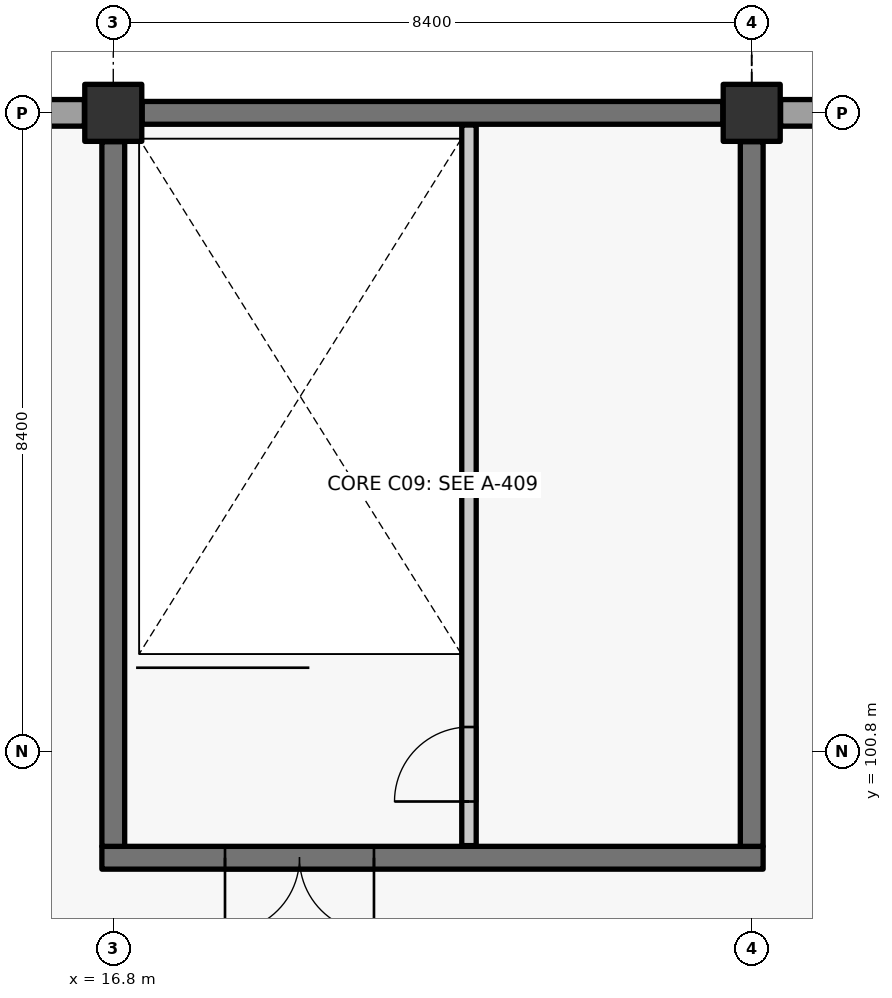
"""IFC4 building model, lengths in metres.
Left out: names, types, materials, properties, quantities, classifications, styles, units other than length and angle.
Written with IfcOpenShell. Run it as: python <this file> out.ifc"""

import sys

from ifc_helpers import new_model, si_unit, direction, frame, frame_2d, origin, origin_2d, place, context, subcontext, project, spatial, rectangle, extrude, element, fill, save


model = new_model("IFC4")
c1 = context("Model", 3, precision=1e-05, world=origin(), true_north=direction((0.0, 1.0)))
c2 = subcontext(c1, "Body", "Model", "MODEL_VIEW")
j1 = project(units=[si_unit("LENGTHUNIT", "METRE"), si_unit("PLANEANGLEUNIT", "RADIAN")], contexts=[c1])
p1 = place(None, origin())
s1 = spatial("IfcSite", under=j1, at=p1, CompositionType="ELEMENT")
p2 = place(p1, origin())
s2 = spatial("IfcBuilding", under=s1, at=p2, CompositionType="ELEMENT")
p3 = place(p2, frame((0.0, 0.0, 11.4)))
s3 = spatial("IfcBuildingStorey", under=s2, at=p3, CompositionType="ELEMENT", Elevation=11.4)
for number, where, z_axis, x_axis in (
    (1, (16.8, 109.2, 0.0), (0.0, 0.0, 1.0), (1.0, 0.0, 0.0)),
    (2, (25.2, 109.2, 0.0), (0.0, 0.0, 1.0), (1.0, 0.0, 0.0)),
):
    element("IfcColumn", number, at=place(p3, frame(where, z_axis=z_axis, x_axis=x_axis)), inside=s3, PredefinedType="COLUMN", context=c2, shape_type="SweptSolid", body=[
        extrude(rectangle(XDim=0.75, YDim=0.75, at=origin_2d()), origin(), (0.0, 0.0, 1.0), 4.8),
    ])
p4 = place(p3, frame((8.78, 109.2, 0.0), z_axis=(0.0, 0.0, 1.0), x_axis=(1.0, 0.0, 0.0)))
e3 = element("IfcWall", 3, at=p4, inside=s3, PredefinedType="SOLIDWALL", context=c2, shape_type="SweptSolid", body=[
    extrude(rectangle(XDim=7.64, YDim=0.35, at=frame_2d((3.82, 0.0))), origin(), (0.0, 0.0, 1.0), 4.52),
])
p5 = place(p4, frame((2.02, 0.0, 1.4)))
e4 = element("IfcOpeningElement", 4, at=p5, cuts=e3, PredefinedType="OPENING", context=c2, shape_type="SweptSolid", body=[
    extrude(rectangle(XDim=3.6, YDim=1.35, at=frame_2d((1.8, 0.675))), frame((0.0, 0.185, 0.0), z_axis=(0.0, -1.0, 0.0), x_axis=(1.0, 0.0, 0.0)), (0.0, 0.0, 1.0), 0.37),
])
p6 = place(p3, frame((25.58, 109.2, 0.0), z_axis=(0.0, 0.0, 1.0), x_axis=(1.0, 0.0, 0.0)))
e5 = element("IfcWall", 5, at=p6, inside=s3, PredefinedType="SOLIDWALL", context=c2, shape_type="SweptSolid", body=[
    extrude(rectangle(XDim=7.64, YDim=0.35, at=frame_2d((3.82, 0.0))), origin(), (0.0, 0.0, 1.0), 4.52),
])
p7 = place(p6, frame((2.02, 0.0, 1.4)))
e6 = element("IfcOpeningElement", 6, at=p7, cuts=e5, PredefinedType="OPENING", context=c2, shape_type="SweptSolid", body=[
    extrude(rectangle(XDim=3.6, YDim=1.35, at=frame_2d((1.8, 0.675))), frame((0.0, 0.185, 0.0), z_axis=(0.0, -1.0, 0.0), x_axis=(1.0, 0.0, 0.0)), (0.0, 0.0, 1.0), 0.37),
])
p8 = place(p3, frame((25.35, 99.4, 0.0), z_axis=(0.0, 0.0, 1.0), x_axis=(-1.0, 0.0, 0.0)))
e7 = element("IfcWall", 7, at=p8, inside=s3, PredefinedType="SHEAR", context=c2, shape_type="SweptSolid", body=[
    extrude(rectangle(XDim=8.7, YDim=0.3, at=frame_2d((4.35, 0.0))), origin(), (0.0, 0.0, 1.0), 4.52),
])
p9 = place(p8, frame((5.12, 0.0, 0.0)))
e8 = element("IfcOpeningElement", 8, at=p9, cuts=e7, PredefinedType="OPENING", context=c2, shape_type="SweptSolid", body=[
    extrude(rectangle(XDim=1.96, YDim=2.2, at=frame_2d((0.98, 1.1))), frame((0.0, 0.16, 0.0), z_axis=(0.0, -1.0, 0.0), x_axis=(1.0, 0.0, 0.0)), (0.0, 0.0, 1.0), 0.32),
])
p10 = place(p3, frame((16.8, 99.55, 0.0), z_axis=(0.0, 0.0, 1.0), x_axis=(0.0, 1.0, 0.0)))
e9 = element("IfcWall", 9, at=p10, inside=s3, PredefinedType="SHEAR", context=c2, shape_type="SweptSolid", body=[
    extrude(rectangle(XDim=9.27, YDim=0.3, at=frame_2d((4.635, 0.0))), origin(), (0.0, 0.0, 1.0), 4.52),
])
p11 = place(p3, frame((17.18, 109.2, 0.0), z_axis=(0.0, 0.0, 1.0), x_axis=(1.0, 0.0, 0.0)))
e10 = element("IfcWall", 10, at=p11, inside=s3, PredefinedType="SHEAR", context=c2, shape_type="SweptSolid", body=[
    extrude(rectangle(XDim=7.64, YDim=0.3, at=frame_2d((3.82, 0.0))), origin(), (0.0, 0.0, 1.0), 4.52),
])
p12 = place(p3, frame((25.2, 108.82, 0.0), z_axis=(0.0, 0.0, 1.0), x_axis=(0.0, -1.0, 0.0)))
e11 = element("IfcWall", 11, at=p12, inside=s3, PredefinedType="SHEAR", context=c2, shape_type="SweptSolid", body=[
    extrude(rectangle(XDim=9.27, YDim=0.3, at=frame_2d((4.635, 0.0))), origin(), (0.0, 0.0, 1.0), 4.52),
])
p13 = place(p3, frame((21.48, 99.56, 0.0), z_axis=(0.0, 0.0, 1.0), x_axis=(0.0, 1.0, 0.0)))
e12 = element("IfcWall", 12, at=p13, inside=s3, PredefinedType="SOLIDWALL", context=c2, shape_type="SweptSolid", body=[
    extrude(rectangle(XDim=9.48, YDim=0.19, at=frame_2d((4.74, 0.0))), origin(), (0.0, 0.0, 1.0), 4.52),
])
p14 = place(p13, frame((0.58, 0.0, 0.0)))
e13 = element("IfcOpeningElement", 13, at=p14, cuts=e12, PredefinedType="OPENING", context=c2, shape_type="SweptSolid", body=[
    extrude(rectangle(XDim=0.98, YDim=2.15, at=frame_2d((0.49, 1.075))), frame((0.0, 0.105, 0.0), z_axis=(0.0, -1.0, 0.0), x_axis=(1.0, 0.0, 0.0)), (0.0, 0.0, 1.0), 0.21),
])
p15 = place(p14, origin())
e14 = element("IfcDoor", 14, at=p15, inside=s3, OperationType="SINGLE_SWING_LEFT", PredefinedType="DOOR", context=c2, shape_type="SweptSolid", body=[
    extrude(rectangle(XDim=0.98, YDim=2.15, at=frame_2d((0.49, 1.075))), frame((0.0, 0.025, 0.0), z_axis=(0.0, -1.0, 0.0), x_axis=(1.0, 0.0, 0.0)), (0.0, 0.0, 1.0), 0.05),
])
fill(e13, e14)
p16 = place(p9, origin())
e15 = element("IfcDoor", 15, at=p16, inside=s3, OperationType="DOUBLE_DOOR_SINGLE_SWING", PredefinedType="DOOR", context=c2, shape_type="SweptSolid", body=[
    extrude(rectangle(XDim=1.96, YDim=2.2, at=frame_2d((0.98, 1.1))), frame((0.0, 0.025, 0.0), z_axis=(0.0, -1.0, 0.0), x_axis=(1.0, 0.0, 0.0)), (0.0, 0.0, 1.0), 0.05),
])
fill(e8, e15)
save(model, sys.argv[1])
